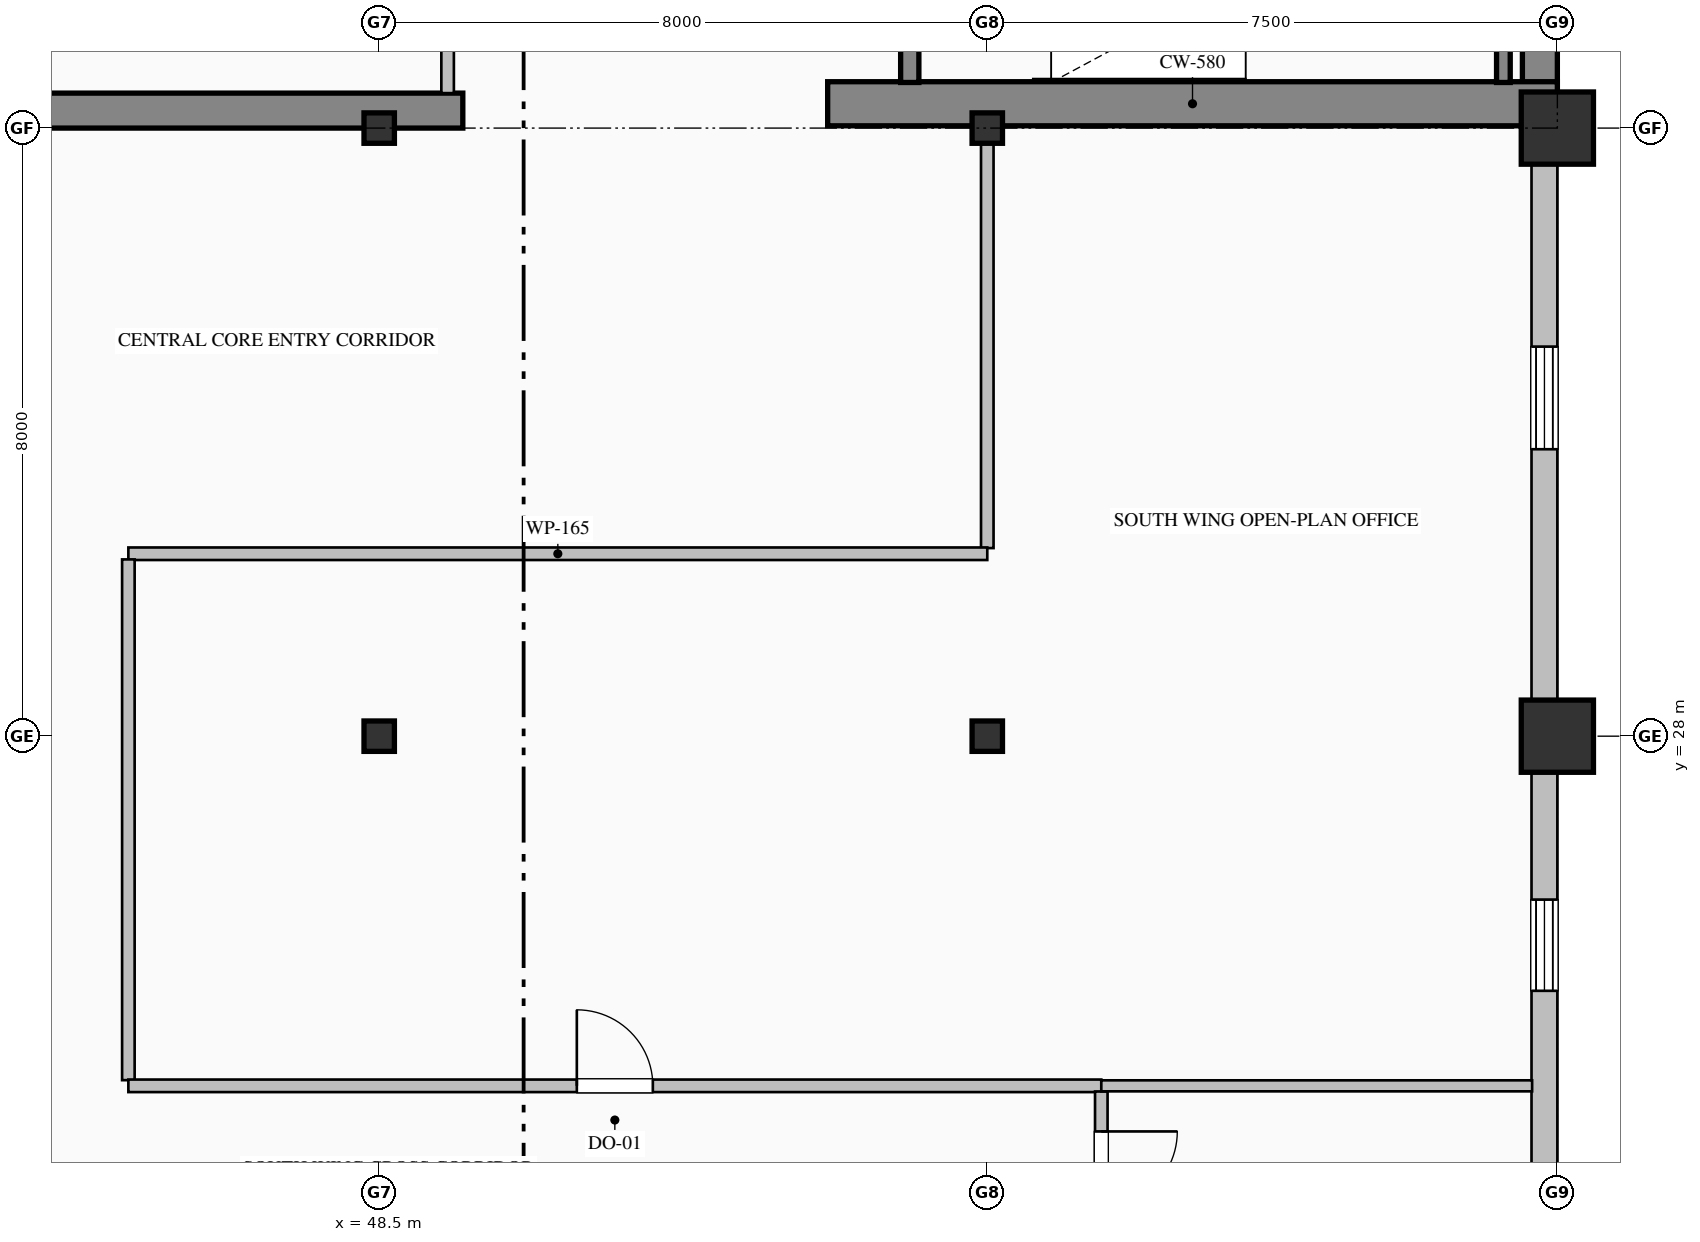
"""IFC4 building model, lengths in metres.
Left out: names, types, materials, properties, quantities, classifications, styles, units other than length and angle.
Written with IfcOpenShell. Run it as: python <this file> out.ifc"""

import sys

from ifc_helpers import new_model, si_unit, direction, frame, frame_2d, origin, origin_2d, place, context, subcontext, project, spatial, rectangle, hollow_rectangle, i_section, extrude, element, fill, save


model = new_model("IFC4")
c1 = context("Model", 3, precision=1e-05, world=origin(), true_north=direction((0.0, 1.0)))
c2 = subcontext(c1, "Body", "Model", "MODEL_VIEW")
j1 = project(units=[si_unit("LENGTHUNIT", "METRE"), si_unit("PLANEANGLEUNIT", "RADIAN")], contexts=[c1])
p1 = place(None, origin())
s1 = spatial("IfcSite", under=j1, at=p1, CompositionType="ELEMENT")
p2 = place(p1, origin())
s2 = spatial("IfcBuilding", under=s1, at=p2, CompositionType="ELEMENT")
p3 = place(p2, frame((0.0, 0.0, 217.8)))
s3 = spatial("IfcBuildingStorey", under=s2, at=p3, CompositionType="ELEMENT", Elevation=217.8)
p4 = place(p3, frame((63.77, 36.32, 0.0), z_axis=(0.0, 0.0, 1.0), x_axis=(0.0, 1.0, 0.0)))
e1 = element("IfcWall", 1, at=p4, inside=s3, PredefinedType="SHEAR", context=c2, shape_type="SweptSolid", body=[
    extrude(rectangle(XDim=15.22, YDim=0.46, at=frame_2d((7.61, 0.0))), origin(), (0.0, 0.0, 1.0), 3.775),
])
p5 = place(p3, frame((40.5, 36.23, 0.0), z_axis=(0.0, 0.0, 1.0), x_axis=(1.0, 0.0, 0.0)))
e2 = element("IfcWall", 2, at=p5, inside=s3, PredefinedType="SHEAR", context=c2, shape_type="SweptSolid", body=[
    extrude(rectangle(XDim=9.1, YDim=0.46, at=frame_2d((4.55, 0.0))), origin(), (0.0, 0.0, 1.0), 3.775),
])
p6 = place(p3, frame((54.4, 36.32, 0.0), z_axis=(0.0, 0.0, 1.0), x_axis=(1.0, 0.0, 0.0)))
e3 = element("IfcWall", 3, at=p6, inside=s3, PredefinedType="SHEAR", context=c2, shape_type="SweptSolid", body=[
    extrude(rectangle(XDim=9.6, YDim=0.58, at=frame_2d((4.8, 0.0))), origin(), (0.0, 0.0, 1.0), 4.0),
])
for number, where, z_axis, x_axis in (
    (4, (48.5, 28.0, 0.0), (0.0, 0.0, 1.0), (1.0, 0.0, 0.0)),
    (5, (48.5, 36.0, 0.0), (0.0, 0.0, 1.0), (1.0, 0.0, 0.0)),
    (6, (56.5, 28.0, 0.0), (0.0, 0.0, 1.0), (1.0, 0.0, 0.0)),
    (7, (56.5, 36.0, 0.0), (0.0, 0.0, 1.0), (1.0, 0.0, 0.0)),
):
    element("IfcColumn", number, at=place(p3, frame(where, z_axis=z_axis, x_axis=x_axis)), inside=s3, PredefinedType="COLUMN", context=c2, shape_type="SweptSolid", body=[
        extrude(i_section(OverallWidth=0.4, OverallDepth=0.4, WebThickness=0.013, FlangeThickness=0.021, FilletRadius=0.022, at=origin_2d()), origin(), (0.0, 0.0, 1.0), 4.0),
    ])
for number, where, z_axis, x_axis in (
    (8, (64.0, 28.0, 0.0), (0.0, 0.0, 1.0), (1.0, 0.0, 0.0)),
    (9, (64.0, 36.0, 0.0), (0.0, 0.0, 1.0), (1.0, 0.0, 0.0)),
):
    element("IfcColumn", number, at=place(p3, frame(where, z_axis=z_axis, x_axis=x_axis)), inside=s3, PredefinedType="COLUMN", context=c2, shape_type="SweptSolid", body=[
        extrude(hollow_rectangle(XDim=0.95, YDim=0.95, WallThickness=0.036, at=origin_2d()), origin(), (0.0, 0.0, 1.0), 4.0),
    ])
p7 = place(p3, frame((63.83, 36.05, 0.0), z_axis=(0.0, 0.0, 1.0), x_axis=(0.0, -1.0, 0.0)))
e10 = element("IfcWall", 10, at=p7, inside=s3, PredefinedType="SOLIDWALL", context=c2, shape_type="SweptSolid", body=[
    extrude(rectangle(XDim=19.55, YDim=0.34, at=frame_2d((9.775, 0.0))), origin(), (0.0, 0.0, 1.0), 3.325),
])
p8 = place(p7, frame((2.925, 0.0, 0.9)))
e11 = element("IfcOpeningElement", 11, at=p8, cuts=e10, PredefinedType="OPENING", context=c2, shape_type="SweptSolid", body=[
    extrude(rectangle(XDim=1.35, YDim=1.85, at=frame_2d((0.675, 0.925))), frame((0.0, 0.18, 0.0), z_axis=(0.0, -1.0, 0.0), x_axis=(1.0, 0.0, 0.0)), (0.0, 0.0, 1.0), 0.36),
])
p9 = place(p7, frame((10.2, 0.0, 0.9)))
e12 = element("IfcOpeningElement", 12, at=p9, cuts=e10, PredefinedType="OPENING", context=c2, shape_type="SweptSolid", body=[
    extrude(rectangle(XDim=1.2, YDim=1.85, at=frame_2d((0.6, 0.925))), frame((0.0, 0.18, 0.0), z_axis=(0.0, -1.0, 0.0), x_axis=(1.0, 0.0, 0.0)), (0.0, 0.0, 1.0), 0.36),
])
p10 = place(p7, frame((13.725, 0.0, 0.9)))
e13 = element("IfcOpeningElement", 13, at=p10, cuts=e10, PredefinedType="OPENING", context=c2, shape_type="SweptSolid", body=[
    extrude(rectangle(XDim=1.35, YDim=1.85, at=frame_2d((0.675, 0.925))), frame((0.0, 0.18, 0.0), z_axis=(0.0, -1.0, 0.0), x_axis=(1.0, 0.0, 0.0)), (0.0, 0.0, 1.0), 0.36),
])
p11 = place(p3, frame((55.48, 39.75, 0.0), z_axis=(0.0, 0.0, 1.0), x_axis=(0.0, -1.0, 0.0)))
e14 = element("IfcWall", 14, at=p11, inside=s3, PredefinedType="SOLIDWALL", context=c2, shape_type="SweptSolid", body=[
    extrude(rectangle(XDim=3.15, YDim=0.24, at=frame_2d((1.575, 0.0))), origin(), (0.0, 0.0, 1.0), 4.0),
])
p12 = place(p11, frame((1.0, 0.0, 0.0)))
e15 = element("IfcOpeningElement", 15, at=p12, cuts=e14, PredefinedType="OPENING", context=c2, shape_type="SweptSolid", body=[
    extrude(rectangle(XDim=1.15, YDim=2.2, at=frame_2d((0.575, 1.1))), frame((0.0, 0.13, 0.0), z_axis=(0.0, -1.0, 0.0), x_axis=(1.0, 0.0, 0.0)), (0.0, 0.0, 1.0), 0.26),
])
p13 = place(p3, frame((63.29, 36.6, 0.0), z_axis=(0.0, 0.0, 1.0), x_axis=(0.0, 1.0, 0.0)))
e16 = element("IfcWall", 16, at=p13, inside=s3, PredefinedType="SOLIDWALL", context=c2, shape_type="SweptSolid", body=[
    extrude(rectangle(XDim=3.15, YDim=0.18, at=frame_2d((1.575, 0.0))), origin(), (0.0, 0.0, 1.0), 4.0),
])
p14 = place(p3, frame((49.4, 36.46, 0.0), z_axis=(0.0, 0.0, 1.0), x_axis=(0.0, 1.0, 0.0)))
e17 = element("IfcWall", 17, at=p14, inside=s3, PredefinedType="PARTITIONING", context=c2, shape_type="SweptSolid", body=[
    extrude(rectangle(XDim=7.69, YDim=0.165, at=frame_2d((3.845, 0.0))), origin(), (0.0, 0.0, 1.0), 3.017),
])
p15 = place(p14, frame((3.345, 0.0, 0.0)))
e18 = element("IfcOpeningElement", 18, at=p15, cuts=e17, PredefinedType="OPENING", context=c2, shape_type="SweptSolid", body=[
    extrude(rectangle(XDim=1.0, YDim=2.15, at=frame_2d((0.5, 1.075))), frame((0.0, 0.093, 0.0), z_axis=(0.0, -1.0, 0.0), x_axis=(1.0, 0.0, 0.0)), (0.0, 0.0, 1.0), 0.185),
])
p16 = place(p3, frame((56.5, 36.0, 0.0), z_axis=(0.0, 0.0, 1.0), x_axis=(0.0, -1.0, 0.0)))
e19 = element("IfcWall", 19, at=p16, inside=s3, PredefinedType="PARTITIONING", context=c2, shape_type="SweptSolid", body=[
    extrude(rectangle(XDim=5.525, YDim=0.165, at=frame_2d((2.763, 0.0))), origin(), (0.0, 0.0, 1.0), 3.179),
])
p17 = place(p3, frame((56.5, 30.4, 0.0), z_axis=(0.0, 0.0, 1.0), x_axis=(-1.0, 0.0, 0.0)))
e20 = element("IfcWall", 20, at=p17, inside=s3, PredefinedType="PARTITIONING", context=c2, shape_type="SweptSolid", body=[
    extrude(rectangle(XDim=11.3, YDim=0.165, at=frame_2d((5.65, 0.0))), origin(), (0.0, 0.0, 1.0), 3.775),
])
p18 = place(p3, frame((45.2, 30.325, 0.0), z_axis=(0.0, 0.0, 1.0), x_axis=(0.0, -1.0, 0.0)))
e21 = element("IfcWall", 21, at=p18, inside=s3, PredefinedType="PARTITIONING", context=c2, shape_type="SweptSolid", body=[
    extrude(rectangle(XDim=6.851, YDim=0.165, at=frame_2d((3.425, 0.0))), origin(), (0.0, 0.0, 1.0), 3.775),
])
p19 = place(p3, frame((45.2, 23.4, 0.0), z_axis=(0.0, 0.0, 1.0), x_axis=(1.0, 0.0, 0.0)))
e22 = element("IfcWall", 22, at=p19, inside=s3, PredefinedType="PARTITIONING", context=c2, shape_type="SweptSolid", body=[
    extrude(rectangle(XDim=12.8, YDim=0.165, at=frame_2d((6.4, 0.0))), origin(), (0.0, 0.0, 1.0), 3.467),
])
p20 = place(p19, frame((5.9, 0.0, 0.0)))
e23 = element("IfcOpeningElement", 23, at=p20, cuts=e22, PredefinedType="OPENING", context=c2, shape_type="SweptSolid", body=[
    extrude(rectangle(XDim=1.0, YDim=2.15, at=frame_2d((0.5, 1.075))), frame((0.0, 0.093, 0.0), z_axis=(0.0, -1.0, 0.0), x_axis=(1.0, 0.0, 0.0)), (0.0, 0.0, 1.0), 0.185),
])
p21 = place(p3, frame((58.0, 23.325, 0.0), z_axis=(0.0, 0.0, 1.0), x_axis=(0.0, -1.0, 0.0)))
e24 = element("IfcWall", 24, at=p21, inside=s3, PredefinedType="PARTITIONING", context=c2, shape_type="SweptSolid", body=[
    extrude(rectangle(XDim=2.051, YDim=0.165, at=frame_2d((1.025, 0.0))), origin(), (0.0, 0.0, 1.0), 3.775),
])
p22 = place(p21, frame((0.525, 0.0, 0.0)))
e25 = element("IfcOpeningElement", 25, at=p22, cuts=e24, PredefinedType="OPENING", context=c2, shape_type="SweptSolid", body=[
    extrude(rectangle(XDim=1.0, YDim=2.15, at=frame_2d((0.5, 1.075))), frame((0.0, 0.093, 0.0), z_axis=(0.0, -1.0, 0.0), x_axis=(1.0, 0.0, 0.0)), (0.0, 0.0, 1.0), 0.185),
])
p23 = place(p3, frame((63.668, 23.4, 0.0), z_axis=(0.0, 0.0, 1.0), x_axis=(-1.0, 0.0, 0.0)))
e26 = element("IfcWall", 26, at=p23, inside=s3, PredefinedType="PARTITIONING", context=c2, shape_type="SweptSolid", body=[
    extrude(rectangle(XDim=5.668, YDim=0.145, at=frame_2d((2.834, 0.0))), origin(), (0.0, 0.0, 1.0), 3.775),
])
p24 = place(p8, origin())
e27 = element("IfcWindow", 27, at=p24, inside=s3, PartitioningType="DOUBLE_PANEL_VERTICAL", PredefinedType="WINDOW", context=c2, shape_type="SweptSolid", body=[
    extrude(rectangle(XDim=1.35, YDim=1.85, at=frame_2d((0.675, 0.925))), frame((0.0, 0.15, 0.0), z_axis=(0.0, -1.0, 0.0), x_axis=(1.0, 0.0, 0.0)), (0.0, 0.0, 1.0), 0.06),
])
fill(e11, e27)
p25 = place(p9, origin())
e28 = element("IfcWindow", 28, at=p25, inside=s3, PartitioningType="DOUBLE_PANEL_VERTICAL", PredefinedType="WINDOW", context=c2, shape_type="SweptSolid", body=[
    extrude(rectangle(XDim=1.2, YDim=1.85, at=frame_2d((0.6, 0.925))), frame((0.0, 0.15, 0.0), z_axis=(0.0, -1.0, 0.0), x_axis=(1.0, 0.0, 0.0)), (0.0, 0.0, 1.0), 0.06),
])
fill(e12, e28)
p26 = place(p20, origin())
e29 = element("IfcDoor", 29, at=p26, inside=s3, OperationType="SINGLE_SWING_LEFT", PredefinedType="DOOR", context=c2, shape_type="SweptSolid", body=[
    extrude(rectangle(XDim=1.0, YDim=2.15, at=frame_2d((0.5, 1.075))), frame((0.0, 0.025, 0.0), z_axis=(0.0, -1.0, 0.0), x_axis=(1.0, 0.0, 0.0)), (0.0, 0.0, 1.0), 0.05),
])
fill(e23, e29)
p27 = place(p22, origin())
e30 = element("IfcDoor", 30, at=p27, inside=s3, OperationType="SINGLE_SWING_LEFT", PredefinedType="DOOR", context=c2, shape_type="SweptSolid", body=[
    extrude(rectangle(XDim=1.0, YDim=2.15, at=frame_2d((0.5, 1.075))), frame((0.0, 0.025, 0.0), z_axis=(0.0, -1.0, 0.0), x_axis=(1.0, 0.0, 0.0)), (0.0, 0.0, 1.0), 0.05),
])
fill(e25, e30)
save(model, sys.argv[1])
